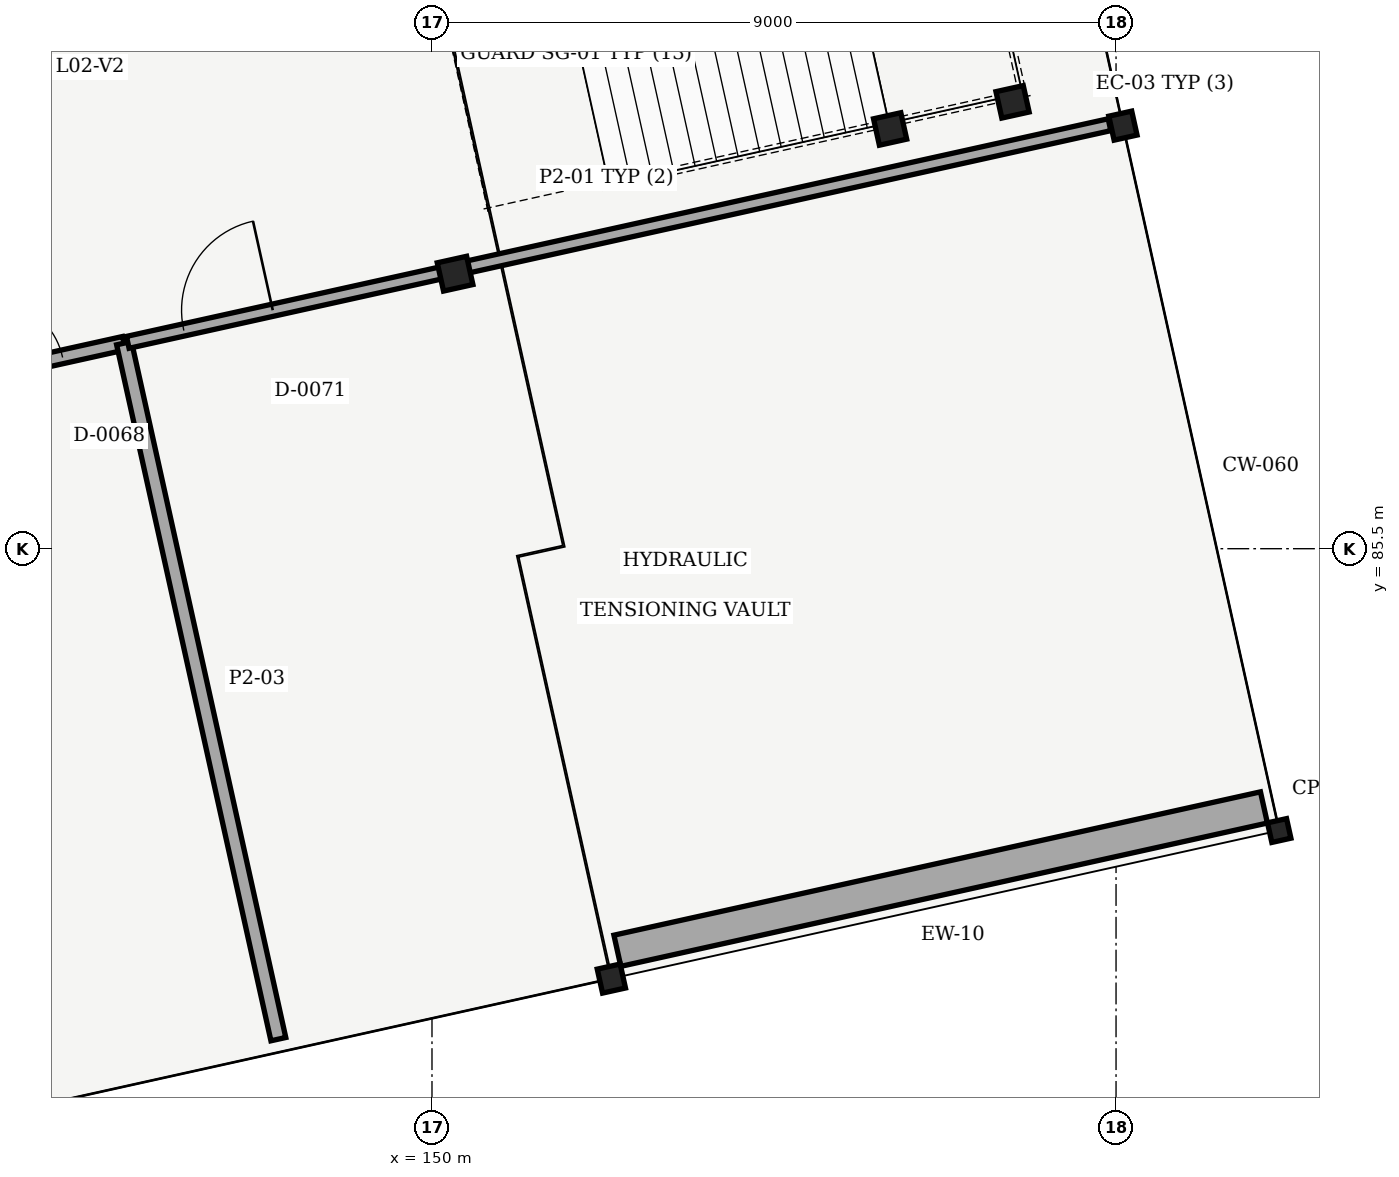
"""IFC4 building model, lengths in metres.
Left out: names, types, materials, properties, quantities, classifications, styles, units other than length and angle.
Written with IfcOpenShell. Run it as: python <this file> out.ifc"""

import sys

from ifc_helpers import new_model, si_unit, direction, frame, frame_2d, origin, origin_with_axes, origin_2d, place, context, subcontext, project, spatial, rectangle, i_section, extrude, element, fill, save


model = new_model("IFC4")
c1 = context("Model", 3, precision=1e-05, world=origin(), true_north=direction((0.0, 1.0)))
c2 = subcontext(c1, "Body", "Model", "MODEL_VIEW")
j1 = project(units=[si_unit("LENGTHUNIT", "METRE"), si_unit("PLANEANGLEUNIT", "RADIAN")], contexts=[c1])
p1 = place(None, origin())
s1 = spatial("IfcSite", under=j1, at=p1, CompositionType="ELEMENT")
p2 = place(p1, origin())
s2 = spatial("IfcBuilding", under=s1, at=p2, CompositionType="ELEMENT")
p3 = place(p2, frame((0.0, 0.0, 9.6)))
s3 = spatial("IfcBuildingStorey", under=s2, at=p3, CompositionType="ELEMENT", Elevation=9.6)
p4 = place(p3, frame((152.36, 79.844, 0.0), z_axis=(0.0, 0.0, 1.0), x_axis=(0.97629600712, 0.216439613938, 0.0)))
e1 = element("IfcColumn", 1, at=p4, inside=s3, PredefinedType="COLUMN", context=c2, shape_type="SweptSolid", body=[
    extrude(i_section(OverallWidth=0.309, OverallDepth=0.323, WebThickness=0.014, FlangeThickness=0.023, FilletRadius=0.013, at=origin_2d()), origin(), (0.0, 0.0, 1.0), 4.8),
])
p5 = place(p3, frame((150.304, 89.119, 0.0), z_axis=(0.0, 0.0, 1.0), x_axis=(0.97629600712, 0.216439613938, 0.0)))
e2 = element("IfcColumn", 2, at=p5, inside=s3, PredefinedType="COLUMN", context=c2, shape_type="SweptSolid", body=[
    extrude(i_section(OverallWidth=0.396, OverallDepth=0.381, WebThickness=0.019, FlangeThickness=0.03, FilletRadius=0.015, at=origin_2d()), origin(), (0.0, 0.0, 1.0), 4.8),
])
p6 = place(p3, frame((161.147, 81.792, 0.0), z_axis=(0.0, 0.0, 1.0), x_axis=(0.97629600712, 0.216439613938, 0.0)))
e3 = element("IfcColumn", 3, at=p6, inside=s3, PredefinedType="PILASTER", context=c2, shape_type="SweptSolid", body=[
    extrude(i_section(OverallWidth=0.257, OverallDepth=0.264, WebThickness=0.012, FlangeThickness=0.02, FilletRadius=0.009, at=origin_2d()), origin(), (0.0, 0.0, 1.0), 4.8),
])
p7 = place(p3, frame((159.091, 91.067, 0.0), z_axis=(0.0, 0.0, 1.0), x_axis=(0.97629600712, 0.216439613938, 0.0)))
e4 = element("IfcColumn", 4, at=p7, inside=s3, PredefinedType="COLUMN", context=c2, shape_type="SweptSolid", body=[
    extrude(i_section(OverallWidth=0.309, OverallDepth=0.323, WebThickness=0.014, FlangeThickness=0.023, FilletRadius=0.013, at=origin_2d()), origin(), (0.0, 0.0, 1.0), 4.8),
])
p8 = place(p3, frame((160.946, 82.095, 0.0), z_axis=(0.0, 0.0, 1.0), x_axis=(-0.976297697165, -0.216431990497, 0.0)))
e5 = element("IfcWall", 5, at=p8, inside=s3, PredefinedType="SOLIDWALL", context=c2, shape_type="SweptSolid", body=[
    extrude(rectangle(XDim=8.713, YDim=0.42, at=frame_2d((4.356, 0.0))), origin(), (0.0, 0.0, 1.0), 3.4),
])
for number, where, z_axis, x_axis in (
    (6, (156.027, 91.023, 0.0), (0.0, 0.0, 1.0), (0.976, 0.216, 0.0)),
    (7, (157.638, 91.38, 0.0), (0.0, 0.0, 1.0), (0.976, 0.216, 0.0)),
):
    element("IfcColumn", number, at=place(p3, frame(where, z_axis=z_axis, x_axis=x_axis)), inside=s3, PredefinedType="COLUMN", context=c2, shape_type="SweptSolid", body=[
        extrude(i_section(OverallWidth=0.368, OverallDepth=0.356, WebThickness=0.011, FlangeThickness=0.018, FilletRadius=0.015, at=origin_2d()), origin(), (0.0, 0.0, 1.0), 2.2),
    ])
p9 = place(p3, frame((124.099, 83.36, 0.0), z_axis=(0.0, 0.0, 1.0), x_axis=(0.976295512731, 0.216441843972, 0.0)))
e8 = element("IfcWall", 8, at=p9, inside=s3, PredefinedType="PARTITIONING", context=c2, shape_type="SweptSolid", body=[
    extrude(rectangle(XDim=22.38, YDim=0.18, at=frame_2d((11.19, 0.0))), origin(), (0.0, 0.0, 1.0), 3.38),
])
p10 = place(p9, frame((20.6, 0.0, 0.0)))
e9 = element("IfcOpeningElement", 9, at=p10, cuts=e8, PredefinedType="OPENING", context=c2, shape_type="SweptSolid", body=[
    extrude(rectangle(XDim=0.95, YDim=2.1, at=frame_2d((0.475, 1.05))), frame((0.0, 0.1, 0.0), z_axis=(0.0, -1.0, 0.0), x_axis=(1.0, 0.0, 0.0)), (0.0, 0.0, 1.0), 0.2),
])
p11 = place(p3, frame((145.948, 88.204, 0.0), z_axis=(0.0, 0.0, 1.0), x_axis=(0.216445399334, -0.97629472451, 0.0)))
e10 = element("IfcWall", 10, at=p11, inside=s3, PredefinedType="PARTITIONING", context=c2, shape_type="SweptSolid", body=[
    extrude(rectangle(XDim=9.38, YDim=0.2, at=frame_2d((4.69, 0.0))), origin(), (0.0, 0.0, 1.0), 3.38),
])
p12 = place(p3, frame((145.997, 88.215, 0.0), z_axis=(0.0, 0.0, 1.0), x_axis=(0.976295056142, 0.216443903478, 0.0)))
e11 = element("IfcWall", 11, at=p12, inside=s3, PredefinedType="PARTITIONING", context=c2, shape_type="SweptSolid", body=[
    extrude(rectangle(XDim=13.23, YDim=0.16, at=frame_2d((6.615, 0.0))), origin(), (0.0, 0.0, 1.0), 3.38),
])
p13 = place(p12, frame((0.754, 0.0, 0.0)))
e12 = element("IfcOpeningElement", 12, at=p13, cuts=e11, PredefinedType="OPENING", context=c2, shape_type="SweptSolid", body=[
    extrude(rectangle(XDim=1.2, YDim=2.15, at=frame_2d((0.6, 1.075))), frame((0.0, 0.09, 0.0), z_axis=(0.0, -1.0, 0.0), x_axis=(1.0, 0.0, 0.0)), (0.0, 0.0, 1.0), 0.18),
])
p14 = place(p10, origin_with_axes())
e13 = element("IfcDoor", 13, at=p14, inside=s3, OperationType="SINGLE_SWING_LEFT", PredefinedType="DOOR", context=c2, shape_type="SweptSolid", body=[
    extrude(rectangle(XDim=0.95, YDim=2.1, at=frame_2d((0.475, 1.05))), frame((0.0, 0.025, 0.0), z_axis=(0.0, -1.0, 0.0), x_axis=(1.0, 0.0, 0.0)), (0.0, 0.0, 1.0), 0.05),
])
fill(e9, e13)
p15 = place(p13, origin_with_axes())
e14 = element("IfcDoor", 14, at=p15, inside=s3, OperationType="SINGLE_SWING_RIGHT", PredefinedType="DOOR", context=c2, shape_type="SweptSolid", body=[
    extrude(rectangle(XDim=1.2, YDim=2.15, at=frame_2d((0.6, 1.075))), frame((0.0, 0.025, 0.0), z_axis=(0.0, -1.0, 0.0), x_axis=(1.0, 0.0, 0.0)), (0.0, 0.0, 1.0), 0.05),
])
fill(e12, e14)
save(model, sys.argv[1])
